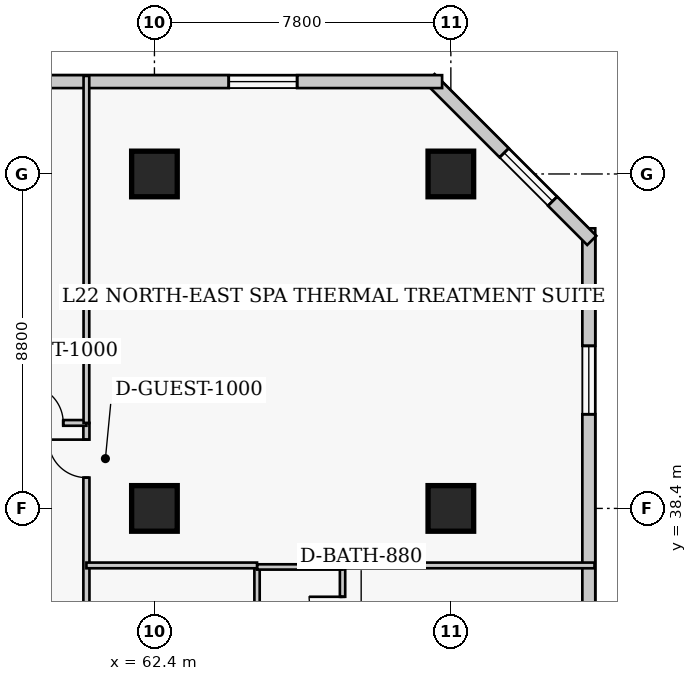
"""IFC4 building model, lengths in metres.
Left out: names, types, materials, properties, quantities, classifications, styles, units other than length and angle.
Written with IfcOpenShell. Run it as: python <this file> out.ifc"""

import sys

from ifc_helpers import new_model, si_unit, direction, frame, frame_2d, origin, origin_2d, place, context, subcontext, project, spatial, rectangle, extrude, element, fill, save


model = new_model("IFC4")
c1 = context("Model", 3, precision=1e-05, world=origin(), true_north=direction((0.0, 1.0)))
c2 = subcontext(c1, "Body", "Model", "MODEL_VIEW")
j1 = project(units=[si_unit("LENGTHUNIT", "METRE"), si_unit("PLANEANGLEUNIT", "RADIAN")], contexts=[c1])
p1 = place(None, origin())
s1 = spatial("IfcSite", under=j1, at=p1, CompositionType="ELEMENT")
p2 = place(p1, origin())
s2 = spatial("IfcBuilding", under=s1, at=p2, CompositionType="ELEMENT")
p3 = place(p2, frame((0.0, 0.0, 91.8)))
s3 = spatial("IfcBuildingStorey", under=s2, at=p3, CompositionType="ELEMENT", Elevation=91.8)
for number, where, z_axis, x_axis in (
    (1, (62.4, 38.4, 0.0), (0.0, 0.0, 1.0), (1.0, 0.0, 0.0)),
    (2, (62.4, 47.2, 0.0), (0.0, 0.0, 1.0), (1.0, 0.0, 0.0)),
    (3, (70.2, 38.4, 0.0), (0.0, 0.0, 1.0), (1.0, 0.0, 0.0)),
    (4, (70.2, 47.2, 0.0), (0.0, 0.0, 1.0), (1.0, 0.0, 0.0)),
):
    element("IfcColumn", number, at=place(p3, frame(where, z_axis=z_axis, x_axis=x_axis)), inside=s3, PredefinedType="COLUMN", context=c2, shape_type="SweptSolid", body=[
        extrude(rectangle(XDim=1.2, YDim=1.2, at=origin_2d()), origin(), (0.0, 0.0, 1.0), 3.8),
    ])
p4 = place(p3, frame((73.83, 13.83, 0.0), z_axis=(0.0, 0.0, 1.0), x_axis=(0.0, 1.0, 0.0)))
e5 = element("IfcWall", 5, at=p4, inside=s3, PredefinedType="SOLIDWALL", context=c2, shape_type="SweptSolid", body=[
    extrude(rectangle(XDim=31.94, YDim=0.34, at=frame_2d((15.97, 0.0))), origin(), (0.0, 0.0, 1.0), 3.54),
])
p5 = place(p4, frame((3.093, 0.0, 0.85)))
e6 = element("IfcOpeningElement", 6, at=p5, cuts=e5, PredefinedType="OPENING", context=c2, shape_type="SweptSolid", body=[
    extrude(rectangle(XDim=1.8, YDim=1.8, at=frame_2d((0.9, 0.9))), frame((0.0, 0.18, 0.0), z_axis=(0.0, -1.0, 0.0), x_axis=(1.0, 0.0, 0.0)), (0.0, 0.0, 1.0), 0.36),
])
p6 = place(p4, frame((11.077, 0.0, 0.85)))
e7 = element("IfcOpeningElement", 7, at=p6, cuts=e5, PredefinedType="OPENING", context=c2, shape_type="SweptSolid", body=[
    extrude(rectangle(XDim=1.8, YDim=1.8, at=frame_2d((0.9, 0.9))), frame((0.0, 0.18, 0.0), z_axis=(0.0, -1.0, 0.0), x_axis=(1.0, 0.0, 0.0)), (0.0, 0.0, 1.0), 0.36),
])
p7 = place(p4, frame((19.062, 0.0, 0.85)))
e8 = element("IfcOpeningElement", 8, at=p7, cuts=e5, PredefinedType="OPENING", context=c2, shape_type="SweptSolid", body=[
    extrude(rectangle(XDim=1.8, YDim=1.8, at=frame_2d((0.9, 0.9))), frame((0.0, 0.18, 0.0), z_axis=(0.0, -1.0, 0.0), x_axis=(1.0, 0.0, 0.0)), (0.0, 0.0, 1.0), 0.36),
])
p8 = place(p4, frame((27.048, 0.0, 0.85)))
e9 = element("IfcOpeningElement", 9, at=p8, cuts=e5, PredefinedType="OPENING", context=c2, shape_type="SweptSolid", body=[
    extrude(rectangle(XDim=1.8, YDim=1.8, at=frame_2d((0.9, 0.9))), frame((0.0, 0.18, 0.0), z_axis=(0.0, -1.0, 0.0), x_axis=(1.0, 0.0, 0.0)), (0.0, 0.0, 1.0), 0.36),
])
p9 = place(p3, frame((73.908, 45.451, 0.0), z_axis=(0.0, 0.0, 1.0), x_axis=(-0.707106781187, 0.707106781187, 0.0)))
e10 = element("IfcWall", 10, at=p9, inside=s3, PredefinedType="SOLIDWALL", context=c2, shape_type="SweptSolid", body=[
    extrude(rectangle(XDim=6.02, YDim=0.34, at=frame_2d((3.01, 0.0))), origin(), (0.0, 0.0, 1.0), 3.54),
])
p10 = place(p9, frame((1.46, 0.0, 0.85)))
e11 = element("IfcOpeningElement", 11, at=p10, cuts=e10, PredefinedType="OPENING", context=c2, shape_type="SweptSolid", body=[
    extrude(rectangle(XDim=1.8, YDim=1.8, at=frame_2d((0.9, 0.9))), frame((0.0, 0.18, 0.0), z_axis=(0.0, -1.0, 0.0), x_axis=(1.0, 0.0, 0.0)), (0.0, 0.0, 1.0), 0.36),
])
p11 = place(p3, frame((69.97, 49.63, 0.0), z_axis=(0.0, 0.0, 1.0), x_axis=(-1.0, 0.0, 0.0)))
e12 = element("IfcWall", 12, at=p11, inside=s3, PredefinedType="SOLIDWALL", context=c2, shape_type="SweptSolid", body=[
    extrude(rectangle(XDim=28.29, YDim=0.34, at=frame_2d((14.145, 0.0))), origin(), (0.0, 0.0, 1.0), 3.54),
])
p12 = place(p11, frame((3.815, 0.0, 0.85)))
e13 = element("IfcOpeningElement", 13, at=p12, cuts=e12, PredefinedType="OPENING", context=c2, shape_type="SweptSolid", body=[
    extrude(rectangle(XDim=1.8, YDim=1.8, at=frame_2d((0.9, 0.9))), frame((0.0, 0.18, 0.0), z_axis=(0.0, -1.0, 0.0), x_axis=(1.0, 0.0, 0.0)), (0.0, 0.0, 1.0), 0.36),
])
p13 = place(p11, frame((13.245, 0.0, 0.85)))
e14 = element("IfcOpeningElement", 14, at=p13, cuts=e12, PredefinedType="OPENING", context=c2, shape_type="SweptSolid", body=[
    extrude(rectangle(XDim=1.8, YDim=1.8, at=frame_2d((0.9, 0.9))), frame((0.0, 0.18, 0.0), z_axis=(0.0, -1.0, 0.0), x_axis=(1.0, 0.0, 0.0)), (0.0, 0.0, 1.0), 0.36),
])
p14 = place(p11, frame((22.675, 0.0, 0.85)))
e15 = element("IfcOpeningElement", 15, at=p14, cuts=e12, PredefinedType="OPENING", context=c2, shape_type="SweptSolid", body=[
    extrude(rectangle(XDim=1.8, YDim=1.8, at=frame_2d((0.9, 0.9))), frame((0.0, 0.18, 0.0), z_axis=(0.0, -1.0, 0.0), x_axis=(1.0, 0.0, 0.0)), (0.0, 0.0, 1.0), 0.36),
])
p15 = place(p3, frame((60.61, 11.85, 0.0), z_axis=(0.0, 0.0, 1.0), x_axis=(0.0, 1.0, 0.0)))
e16 = element("IfcWall", 16, at=p15, inside=s3, PredefinedType="PARTITIONING", context=c2, shape_type="SweptSolid", body=[
    extrude(rectangle(XDim=28.8, YDim=0.16, at=frame_2d((14.4, 0.0))), origin(), (0.0, 0.0, 1.0), 3.54),
])
p16 = place(p15, frame((3.6, 0.0, 0.0)))
e17 = element("IfcOpeningElement", 17, at=p16, cuts=e16, PredefinedType="OPENING", context=c2, shape_type="SweptSolid", body=[
    extrude(rectangle(XDim=0.95, YDim=2.1, at=frame_2d((0.475, 1.05))), frame((0.0, 0.09, 0.0), z_axis=(0.0, -1.0, 0.0), x_axis=(1.0, 0.0, 0.0)), (0.0, 0.0, 1.0), 0.18),
])
p17 = place(p15, frame((12.075, 0.0, 0.0)))
e18 = element("IfcOpeningElement", 18, at=p17, cuts=e16, PredefinedType="OPENING", context=c2, shape_type="SweptSolid", body=[
    extrude(rectangle(XDim=0.95, YDim=2.1, at=frame_2d((0.475, 1.05))), frame((0.0, 0.09, 0.0), z_axis=(0.0, -1.0, 0.0), x_axis=(1.0, 0.0, 0.0)), (0.0, 0.0, 1.0), 0.18),
])
p18 = place(p15, frame((20.525, 0.0, 0.0)))
e19 = element("IfcOpeningElement", 19, at=p18, cuts=e16, PredefinedType="OPENING", context=c2, shape_type="SweptSolid", body=[
    extrude(rectangle(XDim=0.95, YDim=2.1, at=frame_2d((0.475, 1.05))), frame((0.0, 0.09, 0.0), z_axis=(0.0, -1.0, 0.0), x_axis=(1.0, 0.0, 0.0)), (0.0, 0.0, 1.0), 0.18),
])
p19 = place(p15, frame((27.36, 0.0, 0.0)))
e20 = element("IfcOpeningElement", 20, at=p19, cuts=e16, PredefinedType="OPENING", context=c2, shape_type="SweptSolid", body=[
    extrude(rectangle(XDim=1.0, YDim=2.15, at=frame_2d((0.5, 1.075))), frame((0.0, 0.09, 0.0), z_axis=(0.0, -1.0, 0.0), x_axis=(1.0, 0.0, 0.0)), (0.0, 0.0, 1.0), 0.18),
])
p20 = place(p3, frame((56.8, 40.65, 0.0), z_axis=(0.0, 0.0, 1.0), x_axis=(1.0, 0.0, 0.0)))
e21 = element("IfcWall", 21, at=p20, inside=s3, PredefinedType="PARTITIONING", context=c2, shape_type="SweptSolid", body=[
    extrude(rectangle(XDim=3.81, YDim=0.15, at=frame_2d((1.905, 0.0))), origin(), (0.0, 0.0, 1.0), 3.54),
])
p21 = place(p20, frame((2.2, 0.0, 0.0)))
e22 = element("IfcOpeningElement", 22, at=p21, cuts=e21, PredefinedType="OPENING", context=c2, shape_type="SweptSolid", body=[
    extrude(rectangle(XDim=1.0, YDim=2.15, at=frame_2d((0.5, 1.075))), frame((0.0, 0.085, 0.0), z_axis=(0.0, -1.0, 0.0), x_axis=(1.0, 0.0, 0.0)), (0.0, 0.0, 1.0), 0.17),
])
p22 = place(p3, frame((60.61, 40.65, 0.0), z_axis=(0.0, 0.0, 1.0), x_axis=(0.0, 1.0, 0.0)))
e23 = element("IfcWall", 23, at=p22, inside=s3, PredefinedType="PARTITIONING", context=c2, shape_type="SweptSolid", body=[
    extrude(rectangle(XDim=9.13, YDim=0.15, at=frame_2d((4.565, 0.0))), origin(), (0.0, 0.0, 1.0), 3.54),
])
p23 = place(p3, frame((65.1, 34.41, 0.0), z_axis=(0.0, 0.0, 1.0), x_axis=(0.0, 1.0, 0.0)))
e24 = element("IfcWall", 24, at=p23, inside=s3, PredefinedType="PLUMBINGWALL", context=c2, shape_type="SweptSolid", body=[
    extrude(rectangle(XDim=2.45, YDim=0.14, at=frame_2d((1.225, 0.0))), origin(), (0.0, 0.0, 1.0), 3.54),
])
p24 = place(p3, frame((67.35, 34.41, 0.0), z_axis=(0.0, 0.0, 1.0), x_axis=(0.0, 1.0, 0.0)))
e25 = element("IfcWall", 25, at=p24, inside=s3, PredefinedType="PLUMBINGWALL", context=c2, shape_type="SweptSolid", body=[
    extrude(rectangle(XDim=2.45, YDim=0.14, at=frame_2d((1.225, 0.0))), origin(), (0.0, 0.0, 1.0), 3.54),
])
p25 = place(p24, frame((0.785, 0.0, 0.0)))
e26 = element("IfcOpeningElement", 26, at=p25, cuts=e25, PredefinedType="OPENING", context=c2, shape_type="SweptSolid", body=[
    extrude(rectangle(XDim=0.88, YDim=2.05, at=frame_2d((0.44, 1.025))), frame((0.0, 0.08, 0.0), z_axis=(0.0, -1.0, 0.0), x_axis=(1.0, 0.0, 0.0)), (0.0, 0.0, 1.0), 0.16),
])
p26 = place(p3, frame((65.1, 36.86, 0.0), z_axis=(0.0, 0.0, 1.0), x_axis=(1.0, 0.0, 0.0)))
e27 = element("IfcWall", 27, at=p26, inside=s3, PredefinedType="PLUMBINGWALL", context=c2, shape_type="SweptSolid", body=[
    extrude(rectangle(XDim=2.25, YDim=0.14, at=frame_2d((1.125, 0.0))), origin(), (0.0, 0.0, 1.0), 3.54),
])
p27 = place(p3, frame((60.61, 36.9, 0.0), z_axis=(0.0, 0.0, 1.0), x_axis=(1.0, 0.0, 0.0)))
e28 = element("IfcWall", 28, at=p27, inside=s3, PredefinedType="PARTITIONING", context=c2, shape_type="SweptSolid", body=[
    extrude(rectangle(XDim=4.49, YDim=0.15, at=frame_2d((2.245, 0.0))), origin(), (0.0, 0.0, 1.0), 3.54),
])
p28 = place(p3, frame((67.35, 36.9, 0.0), z_axis=(0.0, 0.0, 1.0), x_axis=(1.0, 0.0, 0.0)))
e29 = element("IfcWall", 29, at=p28, inside=s3, PredefinedType="PARTITIONING", context=c2, shape_type="SweptSolid", body=[
    extrude(rectangle(XDim=6.63, YDim=0.15, at=frame_2d((3.315, 0.0))), origin(), (0.0, 0.0, 1.0), 3.54),
])
p29 = place(p8, origin())
e30 = element("IfcWindow", 30, at=p29, inside=s3, PartitioningType="SINGLE_PANEL", PredefinedType="WINDOW", context=c2, shape_type="SweptSolid", body=[
    extrude(rectangle(XDim=1.8, YDim=1.8, at=frame_2d((0.9, 0.9))), frame((0.0, 0.03, 0.0), z_axis=(0.0, -1.0, 0.0), x_axis=(1.0, 0.0, 0.0)), (0.0, 0.0, 1.0), 0.06),
])
fill(e9, e30)
p30 = place(p10, origin())
e31 = element("IfcWindow", 31, at=p30, inside=s3, PartitioningType="SINGLE_PANEL", PredefinedType="WINDOW", context=c2, shape_type="SweptSolid", body=[
    extrude(rectangle(XDim=1.8, YDim=1.8, at=frame_2d((0.9, 0.9))), frame((0.0, 0.03, 0.0), z_axis=(0.0, -1.0, 0.0), x_axis=(1.0, 0.0, 0.0)), (0.0, 0.0, 1.0), 0.06),
])
fill(e11, e31)
p31 = place(p12, origin())
e32 = element("IfcWindow", 32, at=p31, inside=s3, PartitioningType="SINGLE_PANEL", PredefinedType="WINDOW", context=c2, shape_type="SweptSolid", body=[
    extrude(rectangle(XDim=1.8, YDim=1.8, at=frame_2d((0.9, 0.9))), frame((0.0, 0.03, 0.0), z_axis=(0.0, -1.0, 0.0), x_axis=(1.0, 0.0, 0.0)), (0.0, 0.0, 1.0), 0.06),
])
fill(e13, e32)
p32 = place(p21, origin())
e33 = element("IfcDoor", 33, at=p32, inside=s3, OperationType="SINGLE_SWING_LEFT", PredefinedType="DOOR", context=c2, shape_type="SweptSolid", body=[
    extrude(rectangle(XDim=1.0, YDim=2.15, at=frame_2d((0.5, 1.075))), frame((0.0, 0.025, 0.0), z_axis=(0.0, -1.0, 0.0), x_axis=(1.0, 0.0, 0.0)), (0.0, 0.0, 1.0), 0.05),
])
fill(e22, e33)
p33 = place(p25, origin())
e34 = element("IfcDoor", 34, at=p33, inside=s3, OperationType="SINGLE_SWING_RIGHT", PredefinedType="DOOR", context=c2, shape_type="SweptSolid", body=[
    extrude(rectangle(XDim=0.88, YDim=2.05, at=frame_2d((0.44, 1.025))), frame((0.0, 0.025, 0.0), z_axis=(0.0, -1.0, 0.0), x_axis=(1.0, 0.0, 0.0)), (0.0, 0.0, 1.0), 0.05),
])
fill(e26, e34)
p34 = place(p19, origin())
e35 = element("IfcDoor", 35, at=p34, inside=s3, OperationType="SINGLE_SWING_RIGHT", PredefinedType="DOOR", context=c2, shape_type="SweptSolid", body=[
    extrude(rectangle(XDim=1.0, YDim=2.15, at=frame_2d((0.5, 1.075))), frame((0.0, 0.025, 0.0), z_axis=(0.0, -1.0, 0.0), x_axis=(1.0, 0.0, 0.0)), (0.0, 0.0, 1.0), 0.05),
])
fill(e20, e35)
save(model, sys.argv[1])
